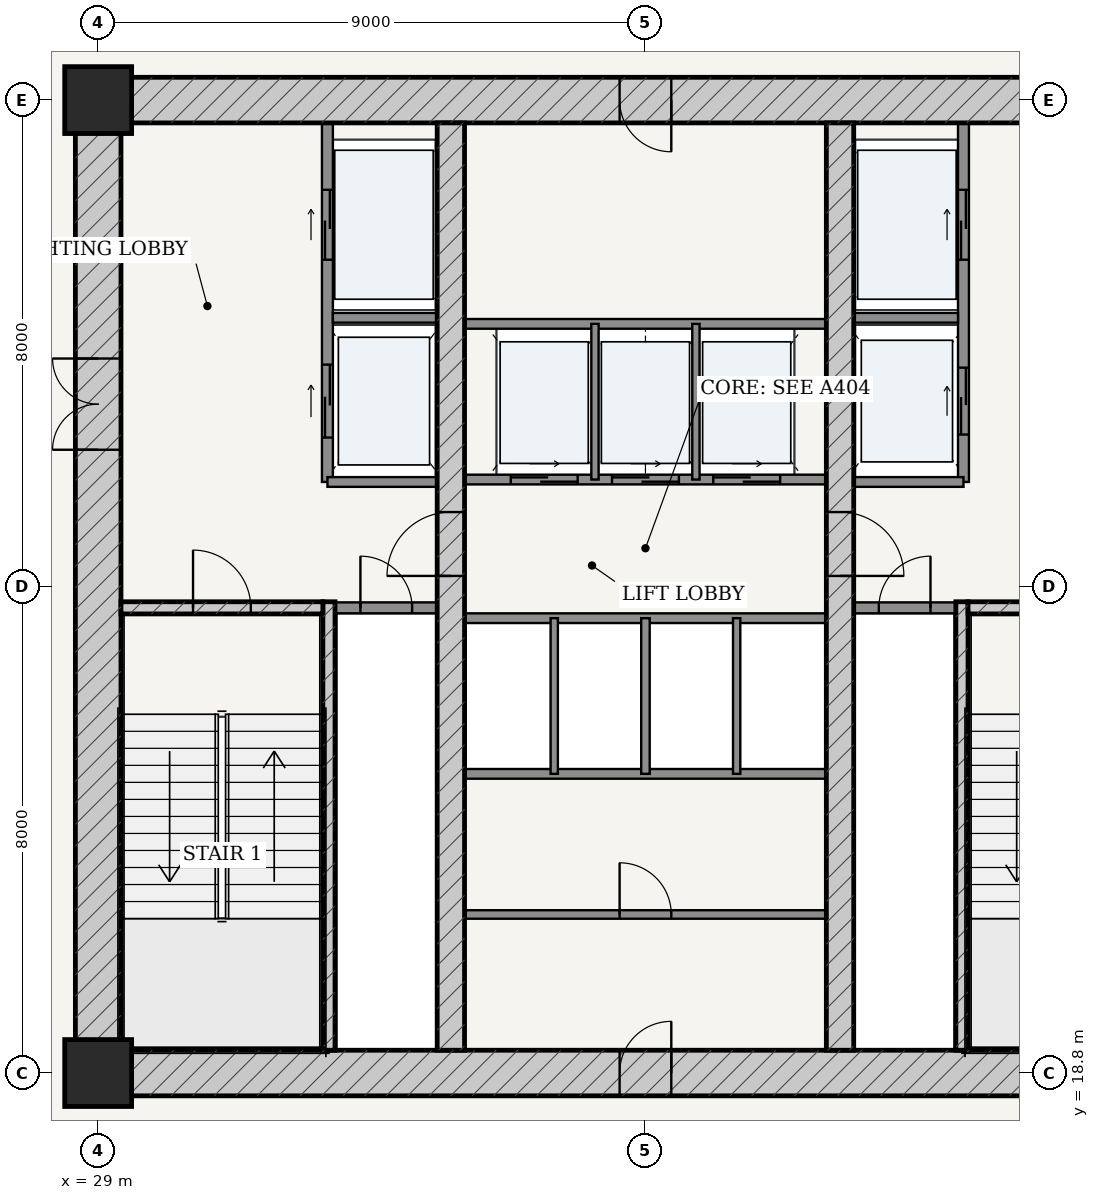
"""IFC4 building model, lengths in metres.
Left out: names, types, materials, properties, quantities, classifications, styles, units other than length and angle.
Written with IfcOpenShell. Run it as: python <this file> out.ifc"""

import sys

from ifc_helpers import new_model, si_unit, direction, frame, frame_2d, origin, origin_2d, place, context, subcontext, project, spatial, rectangle, extrude, source, transform, mapped, element, fill, save


model = new_model("IFC4")
c1 = context("Model", 3, precision=1e-05, world=origin(), true_north=direction((-0.2419218956, 0.970295726276)))
c2 = subcontext(c1, "Body", "Model", "MODEL_VIEW")
j1 = project(units=[si_unit("LENGTHUNIT", "METRE"), si_unit("PLANEANGLEUNIT", "RADIAN")], contexts=[c1])
p1 = place(None, origin())
s1 = spatial("IfcSite", under=j1, at=p1, CompositionType="ELEMENT")
p2 = place(p1, origin())
s2 = spatial("IfcBuilding", under=s1, at=p2, CompositionType="ELEMENT")
p3 = place(p2, frame((0.0, 0.0, 5.4)))
s3 = spatial("IfcBuildingStorey", under=s2, at=p3, CompositionType="ELEMENT", Elevation=5.4)
for number, where, z_axis, x_axis in (
    (1, (29.0, 18.8, 0.0), (0.0, 0.0, 1.0), (1.0, 0.0, 0.0)),
    (2, (29.0, 34.8, 0.0), (0.0, 0.0, 1.0), (1.0, 0.0, 0.0)),
):
    element("IfcColumn", number, at=place(p3, frame(where, z_axis=z_axis, x_axis=x_axis)), inside=s3, PredefinedType="COLUMN", context=c2, shape_type="SweptSolid", body=[
        extrude(rectangle(XDim=1.1, YDim=1.1, at=origin_2d()), origin(), (0.0, 0.0, 1.0), 4.5),
    ])
p4 = place(p3, frame((28.625, 18.8, 0.0), z_axis=(0.0, 0.0, 1.0), x_axis=(1.0, 0.0, 0.0)))
e3 = element("IfcWall", 3, at=p4, inside=s3, PredefinedType="SHEAR", context=c2, shape_type="SweptSolid", body=[
    extrude(rectangle(XDim=18.75, YDim=0.75, at=frame_2d((9.375, 0.0))), origin(), (0.0, 0.0, 1.0), 4.2),
])
p5 = place(p4, frame((8.95, 0.0, 0.0)))
e4 = element("IfcOpeningElement", 4, at=p5, cuts=e3, PredefinedType="OPENING", context=c2, shape_type="SweptSolid", body=[
    extrude(rectangle(XDim=0.85, YDim=2.1, at=frame_2d((0.425, 1.05))), frame((0.0, 0.385, 0.0), z_axis=(0.0, -1.0, 0.0), x_axis=(1.0, 0.0, 0.0)), (0.0, 0.0, 1.0), 0.77),
])
p6 = place(p3, frame((28.625, 34.8, 0.0), z_axis=(0.0, 0.0, 1.0), x_axis=(1.0, 0.0, 0.0)))
e5 = element("IfcWall", 5, at=p6, inside=s3, PredefinedType="SHEAR", context=c2, shape_type="SweptSolid", body=[
    extrude(rectangle(XDim=18.75, YDim=0.75, at=frame_2d((9.375, 0.0))), origin(), (0.0, 0.0, 1.0), 4.2),
])
p7 = place(p6, frame((8.95, 0.0, 0.0)))
e6 = element("IfcOpeningElement", 6, at=p7, cuts=e5, PredefinedType="OPENING", context=c2, shape_type="SweptSolid", body=[
    extrude(rectangle(XDim=0.85, YDim=2.1, at=frame_2d((0.425, 1.05))), frame((0.0, 0.385, 0.0), z_axis=(0.0, -1.0, 0.0), x_axis=(1.0, 0.0, 0.0)), (0.0, 0.0, 1.0), 0.77),
])
p8 = place(p3, frame((29.0, 19.175, 0.0), z_axis=(0.0, 0.0, 1.0), x_axis=(0.0, 1.0, 0.0)))
e7 = element("IfcWall", 7, at=p8, inside=s3, PredefinedType="SHEAR", context=c2, shape_type="SweptSolid", body=[
    extrude(rectangle(XDim=15.25, YDim=0.75, at=frame_2d((7.625, 0.0))), origin(), (0.0, 0.0, 1.0), 4.2),
])
p9 = place(p8, frame((9.875, 0.0, 0.0)))
e8 = element("IfcOpeningElement", 8, at=p9, cuts=e7, PredefinedType="OPENING", context=c2, shape_type="SweptSolid", body=[
    extrude(rectangle(XDim=1.5, YDim=2.2, at=frame_2d((0.75, 1.1))), frame((0.0, 0.385, 0.0), z_axis=(0.0, -1.0, 0.0), x_axis=(1.0, 0.0, 0.0)), (0.0, 0.0, 1.0), 0.77),
])
p10 = place(p3, frame((32.795, 19.175, 0.0), z_axis=(0.0, 0.0, 1.0), x_axis=(0.0, 1.0, 0.0)))
e9 = element("IfcWall", 9, at=p10, inside=s3, PredefinedType="SOLIDWALL", context=c2, shape_type="SweptSolid", body=[
    extrude(rectangle(XDim=7.375, YDim=0.2, at=frame_2d((3.688, 0.0))), origin(), (0.0, 0.0, 1.0), 4.2),
])
p11 = place(p3, frame((29.375, 26.45, 0.0), z_axis=(0.0, 0.0, 1.0), x_axis=(1.0, 0.0, 0.0)))
e10 = element("IfcWall", 10, at=p11, inside=s3, PredefinedType="SOLIDWALL", context=c2, shape_type="SweptSolid", body=[
    extrude(rectangle(XDim=3.32, YDim=0.2, at=frame_2d((1.66, 0.0))), origin(), (0.0, 0.0, 1.0), 4.2),
])
p12 = place(p11, frame((1.185, 0.0, 0.0)))
e11 = element("IfcOpeningElement", 11, at=p12, cuts=e10, PredefinedType="OPENING", context=c2, shape_type="SweptSolid", body=[
    extrude(rectangle(XDim=0.95, YDim=2.15, at=frame_2d((0.475, 1.075))), frame((0.0, 0.11, 0.0), z_axis=(0.0, -1.0, 0.0), x_axis=(1.0, 0.0, 0.0)), (0.0, 0.0, 1.0), 0.22),
])
p13 = place(p3, frame((43.205, 19.175, 0.0), z_axis=(0.0, 0.0, 1.0), x_axis=(0.0, 1.0, 0.0)))
e12 = element("IfcWall", 12, at=p13, inside=s3, PredefinedType="SOLIDWALL", context=c2, shape_type="SweptSolid", body=[
    extrude(rectangle(XDim=7.375, YDim=0.2, at=frame_2d((3.688, 0.0))), origin(), (0.0, 0.0, 1.0), 4.2),
])
p14 = place(p3, frame((43.305, 26.45, 0.0), z_axis=(0.0, 0.0, 1.0), x_axis=(1.0, 0.0, 0.0)))
e13 = element("IfcWall", 13, at=p14, inside=s3, PredefinedType="SOLIDWALL", context=c2, shape_type="SweptSolid", body=[
    extrude(rectangle(XDim=3.32, YDim=0.2, at=frame_2d((1.66, 0.0))), origin(), (0.0, 0.0, 1.0), 4.2),
])
p15 = place(p14, frame((1.185, 0.0, 0.0)))
e14 = element("IfcOpeningElement", 14, at=p15, cuts=e13, PredefinedType="OPENING", context=c2, shape_type="SweptSolid", body=[
    extrude(rectangle(XDim=0.95, YDim=2.15, at=frame_2d((0.475, 1.075))), frame((0.0, 0.11, 0.0), z_axis=(0.0, -1.0, 0.0), x_axis=(1.0, 0.0, 0.0)), (0.0, 0.0, 1.0), 0.22),
])
p16 = place(p3, frame((34.8, 19.175, 0.0), z_axis=(0.0, 0.0, 1.0), x_axis=(0.0, 1.0, 0.0)))
e15 = element("IfcWall", 15, at=p16, inside=s3, PredefinedType="SHEAR", context=c2, shape_type="SweptSolid", body=[
    extrude(rectangle(XDim=15.25, YDim=0.45, at=frame_2d((7.625, 0.0))), origin(), (0.0, 0.0, 1.0), 4.2),
])
p17 = place(p16, frame((7.8, 0.0, 0.0)))
e16 = element("IfcOpeningElement", 16, at=p17, cuts=e15, PredefinedType="OPENING", context=c2, shape_type="SweptSolid", body=[
    extrude(rectangle(XDim=1.05, YDim=2.15, at=frame_2d((0.525, 1.075))), frame((0.0, 0.235, 0.0), z_axis=(0.0, -1.0, 0.0), x_axis=(1.0, 0.0, 0.0)), (0.0, 0.0, 1.0), 0.47),
])
p18 = place(p3, frame((41.2, 19.175, 0.0), z_axis=(0.0, 0.0, 1.0), x_axis=(0.0, 1.0, 0.0)))
e17 = element("IfcWall", 17, at=p18, inside=s3, PredefinedType="SHEAR", context=c2, shape_type="SweptSolid", body=[
    extrude(rectangle(XDim=15.25, YDim=0.45, at=frame_2d((7.625, 0.0))), origin(), (0.0, 0.0, 1.0), 4.2),
])
p19 = place(p18, frame((7.8, 0.0, 0.0)))
e18 = element("IfcOpeningElement", 18, at=p19, cuts=e17, PredefinedType="OPENING", context=c2, shape_type="SweptSolid", body=[
    extrude(rectangle(XDim=1.05, YDim=2.15, at=frame_2d((0.525, 1.075))), frame((0.0, 0.235, 0.0), z_axis=(0.0, -1.0, 0.0), x_axis=(1.0, 0.0, 0.0)), (0.0, 0.0, 1.0), 0.47),
])
p20 = place(p3, frame((32.9, 26.45, 0.0), z_axis=(0.0, 0.0, 1.0), x_axis=(1.0, 0.0, 0.0)))
e19 = element("IfcWall", 19, at=p20, inside=s3, PredefinedType="PARTITIONING", context=c2, shape_type="SweptSolid", body=[
    extrude(rectangle(XDim=1.675, YDim=0.18, at=frame_2d((0.837, 0.0))), origin(), (0.0, 0.0, 1.0), 4.2),
])
p21 = place(p20, frame((0.413, 0.0, 0.0)))
e20 = element("IfcOpeningElement", 20, at=p21, cuts=e19, PredefinedType="OPENING", context=c2, shape_type="SweptSolid", body=[
    extrude(rectangle(XDim=0.85, YDim=2.1, at=frame_2d((0.425, 1.05))), frame((0.0, 0.1, 0.0), z_axis=(0.0, -1.0, 0.0), x_axis=(1.0, 0.0, 0.0)), (0.0, 0.0, 1.0), 0.2),
])
p22 = place(p3, frame((41.425, 26.45, 0.0), z_axis=(0.0, 0.0, 1.0), x_axis=(1.0, 0.0, 0.0)))
e21 = element("IfcWall", 21, at=p22, inside=s3, PredefinedType="PARTITIONING", context=c2, shape_type="SweptSolid", body=[
    extrude(rectangle(XDim=1.675, YDim=0.18, at=frame_2d((0.837, 0.0))), origin(), (0.0, 0.0, 1.0), 4.2),
])
p23 = place(p22, frame((0.413, 0.0, 0.0)))
e22 = element("IfcOpeningElement", 22, at=p23, cuts=e21, PredefinedType="OPENING", context=c2, shape_type="SweptSolid", body=[
    extrude(rectangle(XDim=0.85, YDim=2.1, at=frame_2d((0.425, 1.05))), frame((0.0, 0.1, 0.0), z_axis=(0.0, -1.0, 0.0), x_axis=(1.0, 0.0, 0.0)), (0.0, 0.0, 1.0), 0.2),
])
p24 = place(p3, frame((32.77, 28.52, 0.0), z_axis=(0.0, 0.0, 1.0), x_axis=(0.0, 1.0, 0.0)))
e23 = element("IfcWall", 23, at=p24, inside=s3, PredefinedType="PARTITIONING", context=c2, shape_type="SweptSolid", body=[
    extrude(rectangle(XDim=5.905, YDim=0.18, at=frame_2d((2.953, 0.0))), origin(), (0.0, 0.0, 1.0), 4.2),
])
p25 = place(p24, frame((3.655, 0.0, 0.0)))
e24 = element("IfcOpeningElement", 24, at=p25, cuts=e23, PredefinedType="OPENING", context=c2, shape_type="SweptSolid", body=[
    extrude(rectangle(XDim=1.15, YDim=2.2, at=frame_2d((0.575, 1.1))), frame((0.0, 0.1, 0.0), z_axis=(0.0, -1.0, 0.0), x_axis=(1.0, 0.0, 0.0)), (0.0, 0.0, 1.0), 0.2),
])
p26 = place(p24, frame((0.73, 0.0, 0.0)))
e25 = element("IfcOpeningElement", 25, at=p26, cuts=e23, PredefinedType="OPENING", context=c2, shape_type="SweptSolid", body=[
    extrude(rectangle(XDim=1.2, YDim=2.25, at=frame_2d((0.6, 1.125))), frame((0.0, 0.1, 0.0), z_axis=(0.0, -1.0, 0.0), x_axis=(1.0, 0.0, 0.0)), (0.0, 0.0, 1.0), 0.2),
])
p27 = place(p3, frame((32.86, 31.22, 0.0), z_axis=(0.0, 0.0, 1.0), x_axis=(1.0, 0.0, 0.0)))
e26 = element("IfcWall", 26, at=p27, inside=s3, PredefinedType="PARTITIONING", context=c2, shape_type="SweptSolid", body=[
    extrude(rectangle(XDim=1.715, YDim=0.16, at=frame_2d((0.857, 0.0))), origin(), (0.0, 0.0, 1.0), 4.2),
])
p28 = place(p3, frame((32.77, 28.52, 0.0), z_axis=(0.0, 0.0, 1.0), x_axis=(1.0, 0.0, 0.0)))
e27 = element("IfcWall", 27, at=p28, inside=s3, PredefinedType="PARTITIONING", context=c2, shape_type="SweptSolid", body=[
    extrude(rectangle(XDim=1.805, YDim=0.16, at=frame_2d((0.902, 0.0))), origin(), (0.0, 0.0, 1.0), 4.2),
])
p29 = place(p3, frame((43.23, 28.52, 0.0), z_axis=(0.0, 0.0, 1.0), x_axis=(0.0, 1.0, 0.0)))
e28 = element("IfcWall", 28, at=p29, inside=s3, PredefinedType="PARTITIONING", context=c2, shape_type="SweptSolid", body=[
    extrude(rectangle(XDim=5.905, YDim=0.18, at=frame_2d((2.953, 0.0))), origin(), (0.0, 0.0, 1.0), 4.2),
])
p30 = place(p29, frame((3.655, 0.0, 0.0)))
e29 = element("IfcOpeningElement", 29, at=p30, cuts=e28, PredefinedType="OPENING", context=c2, shape_type="SweptSolid", body=[
    extrude(rectangle(XDim=1.15, YDim=2.2, at=frame_2d((0.575, 1.1))), frame((0.0, 0.1, 0.0), z_axis=(0.0, -1.0, 0.0), x_axis=(1.0, 0.0, 0.0)), (0.0, 0.0, 1.0), 0.2),
])
p31 = place(p29, frame((0.78, 0.0, 0.0)))
e30 = element("IfcOpeningElement", 30, at=p31, cuts=e28, PredefinedType="OPENING", context=c2, shape_type="SweptSolid", body=[
    extrude(rectangle(XDim=1.1, YDim=2.2, at=frame_2d((0.55, 1.1))), frame((0.0, 0.1, 0.0), z_axis=(0.0, -1.0, 0.0), x_axis=(1.0, 0.0, 0.0)), (0.0, 0.0, 1.0), 0.2),
])
p32 = place(p3, frame((41.425, 31.22, 0.0), z_axis=(0.0, 0.0, 1.0), x_axis=(1.0, 0.0, 0.0)))
e31 = element("IfcWall", 31, at=p32, inside=s3, PredefinedType="PARTITIONING", context=c2, shape_type="SweptSolid", body=[
    extrude(rectangle(XDim=1.715, YDim=0.16, at=frame_2d((0.857, 0.0))), origin(), (0.0, 0.0, 1.0), 4.2),
])
p33 = place(p3, frame((41.425, 28.52, 0.0), z_axis=(0.0, 0.0, 1.0), x_axis=(1.0, 0.0, 0.0)))
e32 = element("IfcWall", 32, at=p33, inside=s3, PredefinedType="PARTITIONING", context=c2, shape_type="SweptSolid", body=[
    extrude(rectangle(XDim=1.805, YDim=0.16, at=frame_2d((0.902, 0.0))), origin(), (0.0, 0.0, 1.0), 4.2),
])
p34 = place(p3, frame((35.025, 28.56, 0.0), z_axis=(0.0, 0.0, 1.0), x_axis=(1.0, 0.0, 0.0)))
e33 = element("IfcWall", 33, at=p34, inside=s3, PredefinedType="PARTITIONING", context=c2, shape_type="SweptSolid", body=[
    extrude(rectangle(XDim=5.95, YDim=0.16, at=frame_2d((2.975, 0.0))), origin(), (0.0, 0.0, 1.0), 4.2),
])
p35 = place(p34, frame((0.76, 0.0, 0.0)))
e34 = element("IfcOpeningElement", 34, at=p35, cuts=e33, PredefinedType="OPENING", context=c2, shape_type="SweptSolid", body=[
    extrude(rectangle(XDim=1.1, YDim=2.2, at=frame_2d((0.55, 1.1))), frame((0.0, 0.09, 0.0), z_axis=(0.0, -1.0, 0.0), x_axis=(1.0, 0.0, 0.0)), (0.0, 0.0, 1.0), 0.18),
])
p36 = place(p34, frame((2.425, 0.0, 0.0)))
e35 = element("IfcOpeningElement", 35, at=p36, cuts=e33, PredefinedType="OPENING", context=c2, shape_type="SweptSolid", body=[
    extrude(rectangle(XDim=1.1, YDim=2.2, at=frame_2d((0.55, 1.1))), frame((0.0, 0.09, 0.0), z_axis=(0.0, -1.0, 0.0), x_axis=(1.0, 0.0, 0.0)), (0.0, 0.0, 1.0), 0.18),
])
p37 = place(p34, frame((4.09, 0.0, 0.0)))
e36 = element("IfcOpeningElement", 36, at=p37, cuts=e33, PredefinedType="OPENING", context=c2, shape_type="SweptSolid", body=[
    extrude(rectangle(XDim=1.1, YDim=2.2, at=frame_2d((0.55, 1.1))), frame((0.0, 0.09, 0.0), z_axis=(0.0, -1.0, 0.0), x_axis=(1.0, 0.0, 0.0)), (0.0, 0.0, 1.0), 0.18),
])
p38 = place(p3, frame((35.025, 31.12, 0.0), z_axis=(0.0, 0.0, 1.0), x_axis=(1.0, 0.0, 0.0)))
e37 = element("IfcWall", 37, at=p38, inside=s3, PredefinedType="PARTITIONING", context=c2, shape_type="SweptSolid", body=[
    extrude(rectangle(XDim=5.95, YDim=0.16, at=frame_2d((2.975, 0.0))), origin(), (0.0, 0.0, 1.0), 4.2),
])
for number, where, z_axis, x_axis in (
    (38, (37.17, 28.56, 0.0), (0.0, 0.0, 1.0), (0.0, 1.0, 0.0)),
    (39, (38.83, 28.56, 0.0), (0.0, 0.0, 1.0), (0.0, 1.0, 0.0)),
):
    element("IfcWall", number, at=place(p3, frame(where, z_axis=z_axis, x_axis=x_axis)), inside=s3, PredefinedType="PARTITIONING", context=c2, shape_type="SweptSolid", body=[
        extrude(rectangle(XDim=2.56, YDim=0.12, at=frame_2d((1.28, 0.0))), origin(), (0.0, 0.0, 1.0), 4.2),
    ])
for number, where, z_axis, x_axis in (
    (40, (35.025, 26.28, 0.0), (0.0, 0.0, 1.0), (1.0, 0.0, 0.0)),
    (41, (35.025, 23.72, 0.0), (0.0, 0.0, 1.0), (1.0, 0.0, 0.0)),
):
    element("IfcWall", number, at=place(p3, frame(where, z_axis=z_axis, x_axis=x_axis)), inside=s3, PredefinedType="PARTITIONING", context=c2, shape_type="SweptSolid", body=[
        extrude(rectangle(XDim=5.95, YDim=0.16, at=frame_2d((2.975, 0.0))), origin(), (0.0, 0.0, 1.0), 4.2),
    ])
p39 = place(p3, frame((36.5, 23.72, 0.0), z_axis=(0.0, 0.0, 1.0), x_axis=(0.0, 1.0, 0.0)))
e42 = element("IfcWall", 42, at=p39, inside=s3, PredefinedType="PARTITIONING", context=c2, shape_type="SweptSolid", body=[
    extrude(rectangle(XDim=2.56, YDim=0.12, at=frame_2d((1.28, 0.0))), origin(), (0.0, 0.0, 1.0), 4.2),
])
p40 = place(p3, frame((38.0, 23.72, 0.0), z_axis=(0.0, 0.0, 1.0), x_axis=(0.0, 1.0, 0.0)))
e43 = element("IfcWall", 43, at=p40, inside=s3, PredefinedType="PARTITIONING", context=c2, shape_type="SweptSolid", body=[
    extrude(rectangle(XDim=2.56, YDim=0.14, at=frame_2d((1.28, 0.0))), origin(), (0.0, 0.0, 1.0), 4.2),
])
p41 = place(p3, frame((39.5, 23.72, 0.0), z_axis=(0.0, 0.0, 1.0), x_axis=(0.0, 1.0, 0.0)))
e44 = element("IfcWall", 44, at=p41, inside=s3, PredefinedType="PARTITIONING", context=c2, shape_type="SweptSolid", body=[
    extrude(rectangle(XDim=2.56, YDim=0.12, at=frame_2d((1.28, 0.0))), origin(), (0.0, 0.0, 1.0), 4.2),
])
p42 = place(p3, frame((35.025, 21.407, 0.0), z_axis=(0.0, 0.0, 1.0), x_axis=(1.0, 0.0, 0.0)))
e45 = element("IfcWall", 45, at=p42, inside=s3, PredefinedType="PARTITIONING", context=c2, shape_type="SweptSolid", body=[
    extrude(rectangle(XDim=5.95, YDim=0.14, at=frame_2d((2.975, 0.0))), origin(), (0.0, 0.0, 1.0), 4.2),
])
p43 = place(p42, frame((2.55, 0.0, 0.0)))
e46 = element("IfcOpeningElement", 46, at=p43, cuts=e45, PredefinedType="OPENING", context=c2, shape_type="SweptSolid", body=[
    extrude(rectangle(XDim=0.85, YDim=2.1, at=frame_2d((0.425, 1.05))), frame((0.0, 0.08, 0.0), z_axis=(0.0, -1.0, 0.0), x_axis=(1.0, 0.0, 0.0)), (0.0, 0.0, 1.0), 0.16),
])
m1 = source(origin(), c2, "Body", "SweptSolid", [
    extrude(rectangle(XDim=1.5, YDim=2.2, at=frame_2d((0.75, 1.1))), frame((0.0, 0.025, 0.0), z_axis=(0.0, -1.0, 0.0), x_axis=(1.0, 0.0, 0.0)), (0.0, 0.0, 1.0), 0.05),
])
p44 = place(p9, origin())
e47 = element("IfcDoor", 47, at=p44, inside=s3, OperationType="DOUBLE_DOOR_SINGLE_SWING", PredefinedType="DOOR", context=c2, shape_type="MappedRepresentation", body=[
    mapped(m1, transform((0.0, 0.0, 0.0), scale=1.0)),
])
fill(e8, e47)
m2 = source(origin(), c2, "Body", "SweptSolid", [
    extrude(rectangle(XDim=1.05, YDim=2.15, at=frame_2d((0.525, 1.075))), frame((0.0, 0.025, 0.0), z_axis=(0.0, -1.0, 0.0), x_axis=(1.0, 0.0, 0.0)), (0.0, 0.0, 1.0), 0.05),
])
p45 = place(p17, origin())
e48 = element("IfcDoor", 48, at=p45, inside=s3, OperationType="SINGLE_SWING_LEFT", PredefinedType="DOOR", context=c2, shape_type="MappedRepresentation", body=[
    mapped(m2, transform((0.0, 0.0, 0.0), scale=1.0)),
])
fill(e16, e48)
p46 = place(p19, frame((1.05, 0.0, 0.0), z_axis=(0.0, 0.0, 1.0), x_axis=(-1.0, 0.0, 0.0)))
e49 = element("IfcDoor", 49, at=p46, inside=s3, OperationType="SINGLE_SWING_RIGHT", PredefinedType="DOOR", context=c2, shape_type="MappedRepresentation", body=[
    mapped(m2, transform((0.0, 0.0, 0.0), scale=1.0)),
])
fill(e18, e49)
m3 = source(origin(), c2, "Body", "SweptSolid", [
    extrude(rectangle(XDim=0.95, YDim=2.15, at=frame_2d((0.475, 1.075))), frame((0.0, 0.025, 0.0), z_axis=(0.0, -1.0, 0.0), x_axis=(1.0, 0.0, 0.0)), (0.0, 0.0, 1.0), 0.05),
])
p47 = place(p12, origin())
e50 = element("IfcDoor", 50, at=p47, inside=s3, OperationType="SINGLE_SWING_LEFT", PredefinedType="DOOR", context=c2, shape_type="MappedRepresentation", body=[
    mapped(m3, transform((0.0, 0.0, 0.0), scale=1.0)),
])
fill(e11, e50)
m4 = source(origin(), c2, "Body", "SweptSolid", [
    extrude(rectangle(XDim=0.85, YDim=2.1, at=frame_2d((0.425, 1.05))), frame((0.0, 0.025, 0.0), z_axis=(0.0, -1.0, 0.0), x_axis=(1.0, 0.0, 0.0)), (0.0, 0.0, 1.0), 0.05),
])
p48 = place(p21, origin())
e51 = element("IfcDoor", 51, at=p48, inside=s3, OperationType="SINGLE_SWING_LEFT", PredefinedType="DOOR", context=c2, shape_type="MappedRepresentation", body=[
    mapped(m4, transform((0.0, 0.0, 0.0), scale=1.0)),
])
fill(e20, e51)
p49 = place(p23, origin())
e52 = element("IfcDoor", 52, at=p49, inside=s3, OperationType="SINGLE_SWING_RIGHT", PredefinedType="DOOR", context=c2, shape_type="MappedRepresentation", body=[
    mapped(m4, transform((0.0, 0.0, 0.0), scale=1.0)),
])
fill(e22, e52)
p50 = place(p7, frame((0.85, 0.0, 0.0), z_axis=(0.0, 0.0, 1.0), x_axis=(-1.0, 0.0, 0.0)))
e53 = element("IfcDoor", 53, at=p50, inside=s3, OperationType="SINGLE_SWING_LEFT", PredefinedType="DOOR", context=c2, shape_type="MappedRepresentation", body=[
    mapped(m4, transform((0.0, 0.0, 0.0), scale=1.0)),
])
fill(e6, e53)
p51 = place(p5, origin())
e54 = element("IfcDoor", 54, at=p51, inside=s3, OperationType="SINGLE_SWING_RIGHT", PredefinedType="DOOR", context=c2, shape_type="MappedRepresentation", body=[
    mapped(m4, transform((0.0, 0.0, 0.0), scale=1.0)),
])
fill(e4, e54)
p52 = place(p43, origin())
e55 = element("IfcDoor", 55, at=p52, inside=s3, OperationType="SINGLE_SWING_LEFT", PredefinedType="DOOR", context=c2, shape_type="MappedRepresentation", body=[
    mapped(m4, transform((0.0, 0.0, 0.0), scale=1.0)),
])
fill(e46, e55)
m5 = source(origin(), c2, "Body", "SweptSolid", [
    extrude(rectangle(XDim=1.15, YDim=2.2, at=frame_2d((0.575, 1.1))), frame((0.0, 0.025, 0.0), z_axis=(0.0, -1.0, 0.0), x_axis=(1.0, 0.0, 0.0)), (0.0, 0.0, 1.0), 0.05),
])
p53 = place(p25, origin())
e56 = element("IfcDoor", 56, at=p53, inside=s3, OperationType="DOUBLE_DOOR_SLIDING", PredefinedType="DOOR", context=c2, shape_type="MappedRepresentation", body=[
    mapped(m5, transform((0.0, 0.0, 0.0), scale=1.0)),
])
fill(e24, e56)
p54 = place(p30, origin())
e57 = element("IfcDoor", 57, at=p54, inside=s3, OperationType="DOUBLE_DOOR_SLIDING", PredefinedType="DOOR", context=c2, shape_type="MappedRepresentation", body=[
    mapped(m5, transform((0.0, 0.0, 0.0), scale=1.0)),
])
fill(e29, e57)
m6 = source(origin(), c2, "Body", "SweptSolid", [
    extrude(rectangle(XDim=1.2, YDim=2.25, at=frame_2d((0.6, 1.125))), frame((0.0, 0.025, 0.0), z_axis=(0.0, -1.0, 0.0), x_axis=(1.0, 0.0, 0.0)), (0.0, 0.0, 1.0), 0.05),
])
p55 = place(p26, origin())
e58 = element("IfcDoor", 58, at=p55, inside=s3, OperationType="DOUBLE_DOOR_SLIDING", PredefinedType="DOOR", context=c2, shape_type="MappedRepresentation", body=[
    mapped(m6, transform((0.0, 0.0, 0.0), scale=1.0)),
])
fill(e25, e58)
m7 = source(origin(), c2, "Body", "SweptSolid", [
    extrude(rectangle(XDim=1.1, YDim=2.2, at=frame_2d((0.55, 1.1))), frame((0.0, 0.025, 0.0), z_axis=(0.0, -1.0, 0.0), x_axis=(1.0, 0.0, 0.0)), (0.0, 0.0, 1.0), 0.05),
])
p56 = place(p31, origin())
e59 = element("IfcDoor", 59, at=p56, inside=s3, OperationType="DOUBLE_DOOR_SLIDING", PredefinedType="DOOR", context=c2, shape_type="MappedRepresentation", body=[
    mapped(m7, transform((0.0, 0.0, 0.0), scale=1.0)),
])
fill(e30, e59)
p57 = place(p35, origin())
e60 = element("IfcDoor", 60, at=p57, inside=s3, OperationType="DOUBLE_DOOR_SLIDING", PredefinedType="DOOR", context=c2, shape_type="MappedRepresentation", body=[
    mapped(m7, transform((0.0, 0.0, 0.0), scale=1.0)),
])
fill(e34, e60)
p58 = place(p36, origin())
e61 = element("IfcDoor", 61, at=p58, inside=s3, OperationType="DOUBLE_DOOR_SLIDING", PredefinedType="DOOR", context=c2, shape_type="MappedRepresentation", body=[
    mapped(m7, transform((0.0, 0.0, 0.0), scale=1.0)),
])
fill(e35, e61)
p59 = place(p37, origin())
e62 = element("IfcDoor", 62, at=p59, inside=s3, OperationType="DOUBLE_DOOR_SLIDING", PredefinedType="DOOR", context=c2, shape_type="MappedRepresentation", body=[
    mapped(m7, transform((0.0, 0.0, 0.0), scale=1.0)),
])
fill(e36, e62)
save(model, sys.argv[1])
